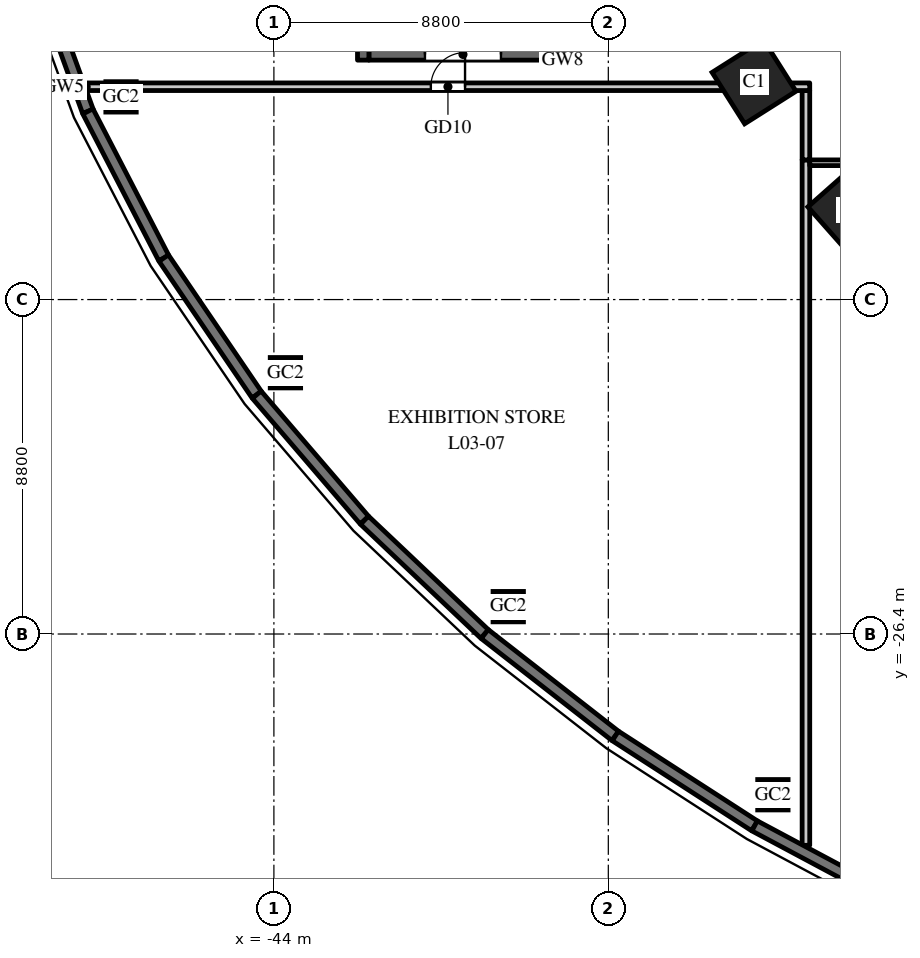
"""IFC4 building model, lengths in metres.
Left out: names, types, materials, properties, quantities, classifications, styles, units other than length and angle.
Written with IfcOpenShell. Run it as: python <this file> out.ifc"""

import sys

from ifc_helpers import new_model, si_unit, direction, frame, frame_2d, origin, origin_2d, place, context, subcontext, project, spatial, rectangle, hollow_rectangle, extrude, element, fill, save


model = new_model("IFC4")
c1 = context("Model", 3, precision=1e-05, world=origin(), true_north=direction((0.0, 1.0)))
c2 = subcontext(c1, "Body", "Model", "MODEL_VIEW")
j1 = project(units=[si_unit("LENGTHUNIT", "METRE"), si_unit("PLANEANGLEUNIT", "RADIAN")], contexts=[c1])
p1 = place(None, origin())
s1 = spatial("IfcSite", under=j1, at=p1, CompositionType="ELEMENT")
p2 = place(p1, origin())
s2 = spatial("IfcBuilding", under=s1, at=p2, CompositionType="ELEMENT")
p3 = place(p2, frame((0.0, 0.0, 19.5)))
s3 = spatial("IfcBuildingStorey", under=s2, at=p3, CompositionType="ELEMENT", Elevation=19.5)
for number, where, z_axis, x_axis in (
    (1, (-31.365, -11.871, 0.0), (0.0, 0.0, 1.0), (0.535, -0.845, 0.0)),
    (2, (-28.819, -15.23, 0.0), (0.0, 0.0, 1.0), (0.663, -0.749, 0.0)),
):
    element("IfcColumn", number, at=place(p3, frame(where, z_axis=z_axis, x_axis=x_axis)), inside=s3, PredefinedType="COLUMN", context=c2, shape_type="SweptSolid", body=[
        extrude(rectangle(XDim=1.6, YDim=1.6, at=origin_2d()), origin(), (0.0, 0.0, 1.0), 5.5),
    ])
for number, where, z_axis, x_axis in (
    (3, (-48.022, -12.267, 0.0), (0.0, 0.0, 1.0), (1.0, 0.0, 0.0)),
    (4, (-43.696, -19.525, 0.0), (0.0, 0.0, 1.0), (1.0, 0.0, 0.0)),
    (5, (-37.833, -25.68, 0.0), (0.0, 0.0, 1.0), (1.0, 0.0, 0.0)),
    (6, (-30.869, -30.629, 0.0), (0.0, 0.0, 1.0), (1.0, 0.0, 0.0)),
):
    element("IfcColumn", number, at=place(p3, frame(where, z_axis=z_axis, x_axis=x_axis)), inside=s3, PredefinedType="COLUMN", context=c2, shape_type="SweptSolid", body=[
        extrude(hollow_rectangle(XDim=0.8, YDim=0.8, WallThickness=0.04, at=origin_2d()), origin(), (0.0, 0.0, 1.0), 5.5),
    ])
p4 = place(p3, frame((-30.0, -31.96, 0.0), z_axis=(0.0, 0.0, 1.0), x_axis=(0.0, 1.0, 0.0)))
e7 = element("IfcWall", 7, at=p4, inside=s3, PredefinedType="PARTITIONING", context=c2, shape_type="SweptSolid", body=[
    extrude(rectangle(XDim=18.035, YDim=0.2, at=frame_2d((9.018, 0.0))), origin(), (0.0, 0.0, 1.0), 4.25),
])
p5 = place(p3, frame((-29.9, -14.0, 0.0), z_axis=(0.0, 0.0, 1.0), x_axis=(1.0, 0.0, 0.0)))
e8 = element("IfcWall", 8, at=p5, inside=s3, PredefinedType="PARTITIONING", context=c2, shape_type="SweptSolid", body=[
    extrude(rectangle(XDim=17.825, YDim=0.15, at=frame_2d((8.913, 0.0))), origin(), (0.0, 0.0, 1.0), 4.2),
])
p6 = place(p5, frame((8.413, 0.0, 0.0)))
e9 = element("IfcOpeningElement", 9, at=p6, cuts=e8, PredefinedType="OPENING", context=c2, shape_type="SweptSolid", body=[
    extrude(rectangle(XDim=1.0, YDim=2.1, at=frame_2d((0.5, 1.05))), frame((0.0, 0.085, 0.0), z_axis=(0.0, -1.0, 0.0), x_axis=(1.0, 0.0, 0.0)), (0.0, 0.0, 1.0), 0.17),
])
p7 = place(p3, frame((-30.0, -12.1, 0.0), z_axis=(0.0, 0.0, 1.0), x_axis=(0.0, -1.0, 0.0)))
e10 = element("IfcWall", 10, at=p7, inside=s3, PredefinedType="PARTITIONING", context=c2, shape_type="SweptSolid", body=[
    extrude(rectangle(XDim=1.826, YDim=0.2, at=frame_2d((0.913, 0.0))), origin(), (0.0, 0.0, 1.0), 4.35),
])
p8 = place(p3, frame((-48.94, -12.0, 0.0), z_axis=(0.0, 0.0, 1.0), x_axis=(1.0, 0.0, 0.0)))
e11 = element("IfcWall", 11, at=p8, inside=s3, PredefinedType="PARTITIONING", context=c2, shape_type="SweptSolid", body=[
    extrude(rectangle(XDim=19.04, YDim=0.2, at=frame_2d((9.52, 0.0))), origin(), (0.0, 0.0, 1.0), 4.25),
])
p9 = place(p8, frame((9.07, 0.0, 0.0)))
e12 = element("IfcOpeningElement", 12, at=p9, cuts=e11, PredefinedType="OPENING", context=c2, shape_type="SweptSolid", body=[
    extrude(rectangle(XDim=0.9, YDim=2.1, at=frame_2d((0.45, 1.05))), frame((0.0, 0.11, 0.0), z_axis=(0.0, -1.0, 0.0), x_axis=(1.0, 0.0, 0.0)), (0.0, 0.0, 1.0), 0.22),
])
p10 = place(p3, frame((-50.376, -8.568, 0.0), z_axis=(0.0, 0.0, 1.0), x_axis=(0.341286990045, -0.939959142956, 0.0)))
e13 = element("IfcWall", 13, at=p10, inside=s3, PredefinedType="SOLIDWALL", context=c2, shape_type="SweptSolid", body=[
    extrude(rectangle(XDim=4.342, YDim=0.3, at=frame_2d((2.171, 0.0))), origin(), (0.0, 0.0, 1.0), 5.25),
])
p11 = place(p10, frame((0.971, 0.0, 1.0)))
e14 = element("IfcOpeningElement", 14, at=p11, cuts=e13, PredefinedType="OPENING", context=c2, shape_type="SweptSolid", body=[
    extrude(rectangle(XDim=2.4, YDim=3.0, at=frame_2d((1.2, 1.5))), frame((0.0, 0.16, 0.0), z_axis=(0.0, -1.0, 0.0), x_axis=(1.0, 0.0, 0.0)), (0.0, 0.0, 1.0), 0.32),
])
p12 = place(p3, frame((-48.894, -12.649, 0.0), z_axis=(0.0, 0.0, 1.0), x_axis=(0.459242531468, -0.888310923771, 0.0)))
e15 = element("IfcWall", 15, at=p12, inside=s3, PredefinedType="SOLIDWALL", context=c2, shape_type="SweptSolid", body=[
    extrude(rectangle(XDim=4.345, YDim=0.3, at=frame_2d((2.172, 0.0))), origin(), (0.0, 0.0, 1.0), 5.25),
])
p13 = place(p12, frame((0.972, 0.0, 1.0)))
e16 = element("IfcOpeningElement", 16, at=p13, cuts=e15, PredefinedType="OPENING", context=c2, shape_type="SweptSolid", body=[
    extrude(rectangle(XDim=2.4, YDim=3.0, at=frame_2d((1.2, 1.5))), frame((0.0, 0.16, 0.0), z_axis=(0.0, -1.0, 0.0), x_axis=(1.0, 0.0, 0.0)), (0.0, 0.0, 1.0), 0.32),
])
p14 = place(p3, frame((-46.899, -16.508, 0.0), z_axis=(0.0, 0.0, 1.0), x_axis=(0.562667738859, -0.82668314102, 0.0)))
e17 = element("IfcWall", 17, at=p14, inside=s3, PredefinedType="SOLIDWALL", context=c2, shape_type="SweptSolid", body=[
    extrude(rectangle(XDim=4.349, YDim=0.3, at=frame_2d((2.174, 0.0))), origin(), (0.0, 0.0, 1.0), 5.25),
])
p15 = place(p14, frame((0.974, 0.0, 1.0)))
e18 = element("IfcOpeningElement", 18, at=p15, cuts=e17, PredefinedType="OPENING", context=c2, shape_type="SweptSolid", body=[
    extrude(rectangle(XDim=2.4, YDim=3.0, at=frame_2d((1.2, 1.5))), frame((0.0, 0.16, 0.0), z_axis=(0.0, -1.0, 0.0), x_axis=(1.0, 0.0, 0.0)), (0.0, 0.0, 1.0), 0.32),
])
p16 = place(p3, frame((-44.452, -20.104, 0.0), z_axis=(0.0, 0.0, 1.0), x_axis=(0.651387059497, -0.758745608699, 0.0)))
e19 = element("IfcWall", 19, at=p16, inside=s3, PredefinedType="SOLIDWALL", context=c2, shape_type="SweptSolid", body=[
    extrude(rectangle(XDim=4.353, YDim=0.3, at=frame_2d((2.176, 0.0))), origin(), (0.0, 0.0, 1.0), 5.25),
])
p17 = place(p16, frame((0.976, 0.0, 1.0)))
e20 = element("IfcOpeningElement", 20, at=p17, cuts=e19, PredefinedType="OPENING", context=c2, shape_type="SweptSolid", body=[
    extrude(rectangle(XDim=2.4, YDim=3.0, at=frame_2d((1.2, 1.5))), frame((0.0, 0.16, 0.0), z_axis=(0.0, -1.0, 0.0), x_axis=(1.0, 0.0, 0.0)), (0.0, 0.0, 1.0), 0.32),
])
p18 = place(p3, frame((-41.617, -23.406, 0.0), z_axis=(0.0, 0.0, 1.0), x_axis=(0.72620446032, -0.687478786444, 0.0)))
e21 = element("IfcWall", 21, at=p18, inside=s3, PredefinedType="SOLIDWALL", context=c2, shape_type="SweptSolid", body=[
    extrude(rectangle(XDim=4.356, YDim=0.3, at=frame_2d((2.178, 0.0))), origin(), (0.0, 0.0, 1.0), 5.25),
])
p19 = place(p18, frame((0.978, 0.0, 1.0)))
e22 = element("IfcOpeningElement", 22, at=p19, cuts=e21, PredefinedType="OPENING", context=c2, shape_type="SweptSolid", body=[
    extrude(rectangle(XDim=2.4, YDim=3.0, at=frame_2d((1.2, 1.5))), frame((0.0, 0.16, 0.0), z_axis=(0.0, -1.0, 0.0), x_axis=(1.0, 0.0, 0.0)), (0.0, 0.0, 1.0), 0.32),
])
p20 = place(p3, frame((-38.453, -26.401, 0.0), z_axis=(0.0, 0.0, 1.0), x_axis=(0.788491985196, -0.615045030288, 0.0)))
e23 = element("IfcWall", 23, at=p20, inside=s3, PredefinedType="SOLIDWALL", context=c2, shape_type="SweptSolid", body=[
    extrude(rectangle(XDim=4.359, YDim=0.3, at=frame_2d((2.18, 0.0))), origin(), (0.0, 0.0, 1.0), 5.25),
])
p21 = place(p20, frame((0.98, 0.0, 1.0)))
e24 = element("IfcOpeningElement", 24, at=p21, cuts=e23, PredefinedType="OPENING", context=c2, shape_type="SweptSolid", body=[
    extrude(rectangle(XDim=2.4, YDim=3.0, at=frame_2d((1.2, 1.5))), frame((0.0, 0.16, 0.0), z_axis=(0.0, -1.0, 0.0), x_axis=(1.0, 0.0, 0.0)), (0.0, 0.0, 1.0), 0.32),
])
p22 = place(p3, frame((-35.016, -29.082, 0.0), z_axis=(0.0, 0.0, 1.0), x_axis=(0.840047348843, -0.542513088969, 0.0)))
e25 = element("IfcWall", 25, at=p22, inside=s3, PredefinedType="SOLIDWALL", context=c2, shape_type="SweptSolid", body=[
    extrude(rectangle(XDim=4.362, YDim=0.3, at=frame_2d((2.181, 0.0))), origin(), (0.0, 0.0, 1.0), 5.25),
])
p23 = place(p22, frame((0.981, 0.0, 1.0)))
e26 = element("IfcOpeningElement", 26, at=p23, cuts=e25, PredefinedType="OPENING", context=c2, shape_type="SweptSolid", body=[
    extrude(rectangle(XDim=2.4, YDim=3.0, at=frame_2d((1.2, 1.5))), frame((0.0, 0.16, 0.0), z_axis=(0.0, -1.0, 0.0), x_axis=(1.0, 0.0, 0.0)), (0.0, 0.0, 1.0), 0.32),
])
p24 = place(p3, frame((-31.352, -31.448, 0.0), z_axis=(0.0, 0.0, 1.0), x_axis=(0.882159305704, -0.47095112205, 0.0)))
e27 = element("IfcWall", 27, at=p24, inside=s3, PredefinedType="SOLIDWALL", context=c2, shape_type="SweptSolid", body=[
    extrude(rectangle(XDim=4.365, YDim=0.3, at=frame_2d((2.182, 0.0))), origin(), (0.0, 0.0, 1.0), 5.25),
])
p25 = place(p24, frame((1.642, 0.0, 1.0)))
e28 = element("IfcOpeningElement", 28, at=p25, cuts=e27, PredefinedType="OPENING", context=c2, shape_type="SweptSolid", body=[
    extrude(rectangle(XDim=2.4, YDim=3.0, at=frame_2d((1.2, 1.5))), frame((0.0, 0.16, 0.0), z_axis=(0.0, -1.0, 0.0), x_axis=(1.0, 0.0, 0.0)), (0.0, 0.0, 1.0), 0.32),
])
for number, where, z_axis, x_axis in (
    (29, (-41.65, -11.3, 0.0), (0.0, 0.0, 1.0), (0.0, 1.0, 0.0)),
    (30, (-36.4, -11.3, 0.0), (0.0, 0.0, 1.0), (0.0, 1.0, 0.0)),
):
    element("IfcWall", number, at=place(p3, frame(where, z_axis=z_axis, x_axis=x_axis)), inside=s3, PredefinedType="SHEAR", context=c2, shape_type="SweptSolid", body=[
        extrude(rectangle(XDim=11.0, YDim=0.3, at=frame_2d((5.5, 0.0))), origin(), (0.0, 0.0, 1.0), 5.25),
    ])
p26 = place(p3, frame((-41.5, -11.15, 0.0), z_axis=(0.0, 0.0, 1.0), x_axis=(1.0, 0.0, 0.0)))
e31 = element("IfcWall", 31, at=p26, inside=s3, PredefinedType="SHEAR", context=c2, shape_type="SweptSolid", body=[
    extrude(rectangle(XDim=4.95, YDim=0.3, at=frame_2d((2.475, 0.0))), origin(), (0.0, 0.0, 1.0), 5.25),
])
p27 = place(p26, frame((1.475, 0.0, 0.0)))
e32 = element("IfcOpeningElement", 32, at=p27, cuts=e31, PredefinedType="OPENING", context=c2, shape_type="SweptSolid", body=[
    extrude(rectangle(XDim=2.0, YDim=2.1, at=frame_2d((1.0, 1.05))), frame((0.0, 0.16, 0.0), z_axis=(0.0, -1.0, 0.0), x_axis=(1.0, 0.0, 0.0)), (0.0, 0.0, 1.0), 0.32),
])
p28 = place(p9, origin())
e33 = element("IfcDoor", 33, at=p28, inside=s3, OperationType="SINGLE_SWING_RIGHT", PredefinedType="DOOR", context=c2, shape_type="SweptSolid", body=[
    extrude(rectangle(XDim=0.9, YDim=2.1, at=frame_2d((0.45, 1.05))), frame((0.0, 0.025, 0.0), z_axis=(0.0, -1.0, 0.0), x_axis=(1.0, 0.0, 0.0)), (0.0, 0.0, 1.0), 0.05),
])
fill(e12, e33)
p29 = place(p11, origin())
e34 = element("IfcWindow", 34, at=p29, inside=s3, PartitioningType="SINGLE_PANEL", PredefinedType="WINDOW", context=c2, shape_type="SweptSolid", body=[
    extrude(rectangle(XDim=2.4, YDim=3.0, at=frame_2d((1.2, 1.5))), frame((0.0, 0.03, 0.0), z_axis=(0.0, -1.0, 0.0), x_axis=(1.0, 0.0, 0.0)), (0.0, 0.0, 1.0), 0.06),
])
fill(e14, e34)
p30 = place(p13, origin())
e35 = element("IfcWindow", 35, at=p30, inside=s3, PartitioningType="SINGLE_PANEL", PredefinedType="WINDOW", context=c2, shape_type="SweptSolid", body=[
    extrude(rectangle(XDim=2.4, YDim=3.0, at=frame_2d((1.2, 1.5))), frame((0.0, 0.03, 0.0), z_axis=(0.0, -1.0, 0.0), x_axis=(1.0, 0.0, 0.0)), (0.0, 0.0, 1.0), 0.06),
])
fill(e16, e35)
p31 = place(p15, origin())
e36 = element("IfcWindow", 36, at=p31, inside=s3, PartitioningType="SINGLE_PANEL", PredefinedType="WINDOW", context=c2, shape_type="SweptSolid", body=[
    extrude(rectangle(XDim=2.4, YDim=3.0, at=frame_2d((1.2, 1.5))), frame((0.0, 0.03, 0.0), z_axis=(0.0, -1.0, 0.0), x_axis=(1.0, 0.0, 0.0)), (0.0, 0.0, 1.0), 0.06),
])
fill(e18, e36)
p32 = place(p17, origin())
e37 = element("IfcWindow", 37, at=p32, inside=s3, PartitioningType="SINGLE_PANEL", PredefinedType="WINDOW", context=c2, shape_type="SweptSolid", body=[
    extrude(rectangle(XDim=2.4, YDim=3.0, at=frame_2d((1.2, 1.5))), frame((0.0, 0.03, 0.0), z_axis=(0.0, -1.0, 0.0), x_axis=(1.0, 0.0, 0.0)), (0.0, 0.0, 1.0), 0.06),
])
fill(e20, e37)
p33 = place(p19, origin())
e38 = element("IfcWindow", 38, at=p33, inside=s3, PartitioningType="SINGLE_PANEL", PredefinedType="WINDOW", context=c2, shape_type="SweptSolid", body=[
    extrude(rectangle(XDim=2.4, YDim=3.0, at=frame_2d((1.2, 1.5))), frame((0.0, 0.03, 0.0), z_axis=(0.0, -1.0, 0.0), x_axis=(1.0, 0.0, 0.0)), (0.0, 0.0, 1.0), 0.06),
])
fill(e22, e38)
p34 = place(p21, origin())
e39 = element("IfcWindow", 39, at=p34, inside=s3, PartitioningType="SINGLE_PANEL", PredefinedType="WINDOW", context=c2, shape_type="SweptSolid", body=[
    extrude(rectangle(XDim=2.4, YDim=3.0, at=frame_2d((1.2, 1.5))), frame((0.0, 0.03, 0.0), z_axis=(0.0, -1.0, 0.0), x_axis=(1.0, 0.0, 0.0)), (0.0, 0.0, 1.0), 0.06),
])
fill(e24, e39)
p35 = place(p23, origin())
e40 = element("IfcWindow", 40, at=p35, inside=s3, PartitioningType="SINGLE_PANEL", PredefinedType="WINDOW", context=c2, shape_type="SweptSolid", body=[
    extrude(rectangle(XDim=2.4, YDim=3.0, at=frame_2d((1.2, 1.5))), frame((0.0, 0.03, 0.0), z_axis=(0.0, -1.0, 0.0), x_axis=(1.0, 0.0, 0.0)), (0.0, 0.0, 1.0), 0.06),
])
fill(e26, e40)
p36 = place(p25, origin())
e41 = element("IfcWindow", 41, at=p36, inside=s3, PartitioningType="SINGLE_PANEL", PredefinedType="WINDOW", context=c2, shape_type="SweptSolid", body=[
    extrude(rectangle(XDim=2.4, YDim=3.0, at=frame_2d((1.2, 1.5))), frame((0.0, 0.03, 0.0), z_axis=(0.0, -1.0, 0.0), x_axis=(1.0, 0.0, 0.0)), (0.0, 0.0, 1.0), 0.06),
])
fill(e28, e41)
p37 = place(p27, origin())
e42 = element("IfcDoor", 42, at=p37, inside=s3, OperationType="DOUBLE_DOOR_SINGLE_SWING", PredefinedType="DOOR", context=c2, shape_type="SweptSolid", body=[
    extrude(rectangle(XDim=2.0, YDim=2.1, at=frame_2d((1.0, 1.05))), frame((0.0, 0.025, 0.0), z_axis=(0.0, -1.0, 0.0), x_axis=(1.0, 0.0, 0.0)), (0.0, 0.0, 1.0), 0.05),
])
fill(e32, e42)
save(model, sys.argv[1])
